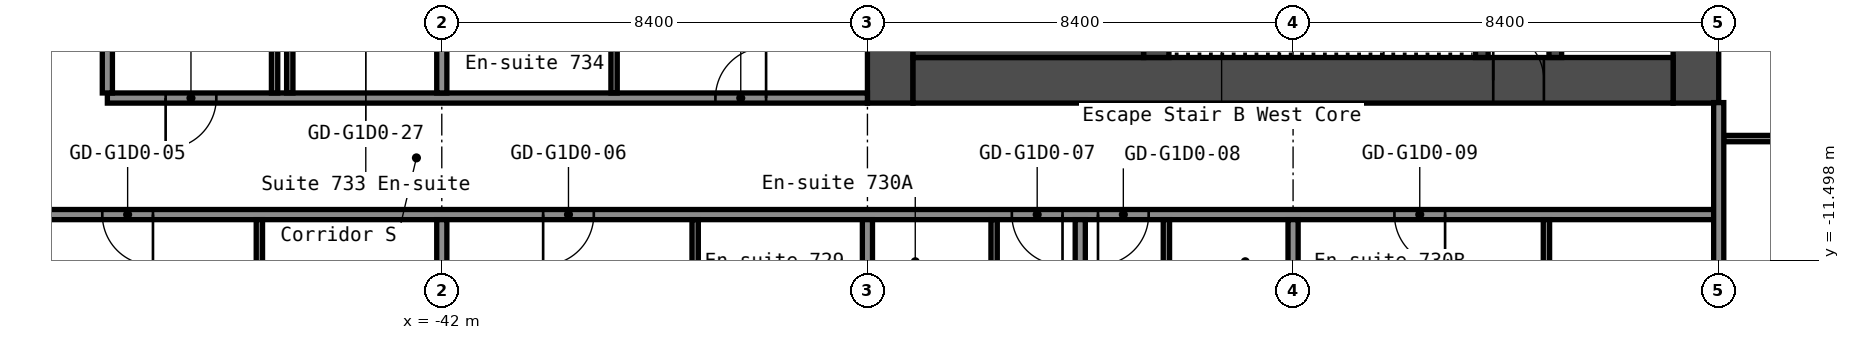
"""IFC4 building model, lengths in metres.
Left out: names, types, materials, properties, quantities, classifications, styles, units other than length and angle.
Written with IfcOpenShell. Run it as: python <this file> out.ifc"""

import sys

from ifc_helpers import new_model, si_unit, direction, frame, frame_2d, origin, place, context, subcontext, project, spatial, rectangle, extrude, element, fill, save


model = new_model("IFC4")
c1 = context("Model", 3, precision=1e-05, world=origin(), true_north=direction((0.0, 1.0)))
c2 = subcontext(c1, "Body", "Model", "MODEL_VIEW")
j1 = project(units=[si_unit("LENGTHUNIT", "METRE"), si_unit("PLANEANGLEUNIT", "RADIAN")], contexts=[c1])
p1 = place(None, origin())
s1 = spatial("IfcSite", under=j1, at=p1, CompositionType="ELEMENT")
p2 = place(p1, origin())
s2 = spatial("IfcBuilding", under=s1, at=p2, CompositionType="ELEMENT")
p3 = place(p2, frame((0.0, 0.0, 29.4)))
s3 = spatial("IfcBuildingStorey", under=s2, at=p3, CompositionType="ELEMENT", Elevation=29.4)
p4 = place(p3, frame((-17.25, -8.4, 0.0), z_axis=(0.0, 0.0, 1.0), x_axis=(0.0, 1.0, 0.0)))
e1 = element("IfcWall", 1, at=p4, inside=s3, PredefinedType="SHEAR", context=c2, shape_type="SweptSolid", body=[
    extrude(rectangle(XDim=16.8, YDim=0.9, at=frame_2d((8.4, 0.0))), origin(), (0.0, 0.0, 1.0), 2.8),
])
p5 = place(p4, frame((12.75, 0.0, 0.0)))
e2 = element("IfcOpeningElement", 2, at=p5, cuts=e1, PredefinedType="OPENING", context=c2, shape_type="SweptSolid", body=[
    extrude(rectangle(XDim=1.2, YDim=2.1, at=frame_2d((0.6, 1.05))), frame((0.0, 0.46, 0.0), z_axis=(0.0, -1.0, 0.0), x_axis=(1.0, 0.0, 0.0)), (0.0, 0.0, 1.0), 0.92),
])
p6 = place(p4, frame((2.85, 0.0, 0.0)))
e3 = element("IfcOpeningElement", 3, at=p6, cuts=e1, PredefinedType="OPENING", context=c2, shape_type="SweptSolid", body=[
    extrude(rectangle(XDim=1.2, YDim=2.1, at=frame_2d((0.6, 1.05))), frame((0.0, 0.46, 0.0), z_axis=(0.0, -1.0, 0.0), x_axis=(1.0, 0.0, 0.0)), (0.0, 0.0, 1.0), 0.92),
])
p7 = place(p3, frame((-33.15, -8.4, 0.0), z_axis=(0.0, 0.0, 1.0), x_axis=(0.0, 1.0, 0.0)))
e4 = element("IfcWall", 4, at=p7, inside=s3, PredefinedType="SHEAR", context=c2, shape_type="SweptSolid", body=[
    extrude(rectangle(XDim=16.8, YDim=0.9, at=frame_2d((8.4, 0.0))), origin(), (0.0, 0.0, 1.0), 2.8),
])
p8 = place(p3, frame((-32.7, -7.95, 0.0), z_axis=(0.0, 0.0, 1.0), x_axis=(1.0, 0.0, 0.0)))
e5 = element("IfcWall", 5, at=p8, inside=s3, PredefinedType="SHEAR", context=c2, shape_type="SweptSolid", body=[
    extrude(rectangle(XDim=15.0, YDim=0.9, at=frame_2d((7.5, 0.0))), origin(), (0.0, 0.0, 1.0), 2.8),
])
p9 = place(p8, frame((11.45, 0.0, 0.0)))
e6 = element("IfcOpeningElement", 6, at=p9, cuts=e5, PredefinedType="OPENING", context=c2, shape_type="SweptSolid", body=[
    extrude(rectangle(XDim=1.0, YDim=2.1, at=frame_2d((0.5, 1.05))), frame((0.0, 0.46, 0.0), z_axis=(0.0, -1.0, 0.0), x_axis=(1.0, 0.0, 0.0)), (0.0, 0.0, 1.0), 0.92),
])
p10 = place(p3, frame((-20.025, -7.5, 0.0), z_axis=(0.0, 0.0, 1.0), x_axis=(0.0, 1.0, 0.0)))
e7 = element("IfcWall", 7, at=p10, inside=s3, PredefinedType="SHEAR", context=c2, shape_type="SweptSolid", body=[
    extrude(rectangle(XDim=6.3, YDim=0.25, at=frame_2d((3.15, 0.0))), origin(), (0.0, 0.0, 1.0), 2.8),
])
p11 = place(p10, frame((2.4, 0.0, 0.0)))
e8 = element("IfcOpeningElement", 8, at=p11, cuts=e7, PredefinedType="OPENING", context=c2, shape_type="SweptSolid", body=[
    extrude(rectangle(XDim=1.0, YDim=2.1, at=frame_2d((0.5, 1.05))), frame((0.0, 0.135, 0.0), z_axis=(0.0, -1.0, 0.0), x_axis=(1.0, 0.0, 0.0)), (0.0, 0.0, 1.0), 0.27),
])
p12 = place(p3, frame((-21.475, -7.5, 0.0), z_axis=(0.0, 0.0, 1.0), x_axis=(0.0, 1.0, 0.0)))
e9 = element("IfcWall", 9, at=p12, inside=s3, PredefinedType="SHEAR", context=c2, shape_type="SweptSolid", body=[
    extrude(rectangle(XDim=3.75, YDim=0.25, at=frame_2d((1.875, 0.0))), origin(), (0.0, 0.0, 1.0), 2.8),
])
p13 = place(p12, frame((1.3, 0.0, 0.0)))
e10 = element("IfcOpeningElement", 10, at=p13, cuts=e9, PredefinedType="OPENING", context=c2, shape_type="SweptSolid", body=[
    extrude(rectangle(XDim=1.2, YDim=2.1, at=frame_2d((0.6, 1.05))), frame((0.0, 0.135, 0.0), z_axis=(0.0, -1.0, 0.0), x_axis=(1.0, 0.0, 0.0)), (0.0, 0.0, 1.0), 0.27),
])
p14 = place(p3, frame((-27.9, -7.5, 0.0), z_axis=(0.0, 0.0, 1.0), x_axis=(0.0, 1.0, 0.0)))
e11 = element("IfcWall", 11, at=p14, inside=s3, PredefinedType="SHEAR", context=c2, shape_type="SweptSolid", body=[
    extrude(rectangle(XDim=3.75, YDim=0.5, at=frame_2d((1.875, 0.0))), origin(), (0.0, 0.0, 1.0), 2.8),
])
p15 = place(p3, frame((-32.7, -6.75, 0.0), z_axis=(0.0, 0.0, 1.0), x_axis=(1.0, 0.0, 0.0)))
e12 = element("IfcWall", 12, at=p15, inside=s3, PredefinedType="SHEAR", context=c2, shape_type="SweptSolid", body=[
    extrude(rectangle(XDim=4.55, YDim=1.5, at=frame_2d((2.275, 0.0))), origin(), (0.0, 0.0, 1.0), 2.8),
])
p16 = place(p3, frame((-51.1, -10.6, 0.0), z_axis=(0.0, 0.0, 1.0), x_axis=(1.0, 0.0, 0.0)))
e13 = element("IfcWall", 13, at=p16, inside=s3, PredefinedType="PARTITIONING", context=c2, shape_type="SweptSolid", body=[
    extrude(rectangle(XDim=34.3, YDim=0.2, at=frame_2d((17.15, 0.0))), origin(), (0.0, 0.0, 1.0), 2.8),
])
p17 = place(p16, frame((2.4, 0.0, 0.0)))
e14 = element("IfcOpeningElement", 14, at=p17, cuts=e13, PredefinedType="OPENING", context=c2, shape_type="SweptSolid", body=[
    extrude(rectangle(XDim=1.0, YDim=2.1, at=frame_2d((0.5, 1.05))), frame((0.0, 0.11, 0.0), z_axis=(0.0, -1.0, 0.0), x_axis=(1.0, 0.0, 0.0)), (0.0, 0.0, 1.0), 0.22),
])
p18 = place(p16, frame((11.1, 0.0, 0.0)))
e15 = element("IfcOpeningElement", 15, at=p18, cuts=e13, PredefinedType="OPENING", context=c2, shape_type="SweptSolid", body=[
    extrude(rectangle(XDim=1.0, YDim=2.1, at=frame_2d((0.5, 1.05))), frame((0.0, 0.11, 0.0), z_axis=(0.0, -1.0, 0.0), x_axis=(1.0, 0.0, 0.0)), (0.0, 0.0, 1.0), 0.22),
])
p19 = place(p16, frame((20.35, 0.0, 0.0)))
e16 = element("IfcOpeningElement", 16, at=p19, cuts=e13, PredefinedType="OPENING", context=c2, shape_type="SweptSolid", body=[
    extrude(rectangle(XDim=1.0, YDim=2.1, at=frame_2d((0.5, 1.05))), frame((0.0, 0.11, 0.0), z_axis=(0.0, -1.0, 0.0), x_axis=(1.0, 0.0, 0.0)), (0.0, 0.0, 1.0), 0.22),
])
p20 = place(p16, frame((22.05, 0.0, 0.0)))
e17 = element("IfcOpeningElement", 17, at=p20, cuts=e13, PredefinedType="OPENING", context=c2, shape_type="SweptSolid", body=[
    extrude(rectangle(XDim=1.0, YDim=2.1, at=frame_2d((0.5, 1.05))), frame((0.0, 0.11, 0.0), z_axis=(0.0, -1.0, 0.0), x_axis=(1.0, 0.0, 0.0)), (0.0, 0.0, 1.0), 0.22),
])
p21 = place(p16, frame((27.9, 0.0, 0.0)))
e18 = element("IfcOpeningElement", 18, at=p21, cuts=e13, PredefinedType="OPENING", context=c2, shape_type="SweptSolid", body=[
    extrude(rectangle(XDim=1.0, YDim=2.1, at=frame_2d((0.5, 1.05))), frame((0.0, 0.11, 0.0), z_axis=(0.0, -1.0, 0.0), x_axis=(1.0, 0.0, 0.0)), (0.0, 0.0, 1.0), 0.22),
])
p22 = place(p3, frame((-16.7, -9.1, 0.0), z_axis=(0.0, 0.0, 1.0), x_axis=(1.0, 0.0, 0.0)))
e19 = element("IfcWall", 19, at=p22, inside=s3, PredefinedType="PARTITIONING", context=c2, shape_type="SweptSolid", body=[
    extrude(rectangle(XDim=2.337, YDim=0.125, at=frame_2d((1.169, 0.0))), origin(), (0.0, 0.0, 1.0), 2.8),
])
p23 = place(p3, frame((-48.6, -8.3, 0.0), z_axis=(0.0, 0.0, 1.0), x_axis=(1.0, 0.0, 0.0)))
e20 = element("IfcWall", 20, at=p23, inside=s3, PredefinedType="PARTITIONING", context=c2, shape_type="SweptSolid", body=[
    extrude(rectangle(XDim=15.0, YDim=0.2, at=frame_2d((7.5, 0.0))), origin(), (0.0, 0.0, 1.0), 2.8),
])
p24 = place(p23, frame((1.15, 0.0, 0.0)))
e21 = element("IfcOpeningElement", 21, at=p24, cuts=e20, PredefinedType="OPENING", context=c2, shape_type="SweptSolid", body=[
    extrude(rectangle(XDim=1.0, YDim=2.1, at=frame_2d((0.5, 1.05))), frame((0.0, 0.11, 0.0), z_axis=(0.0, -1.0, 0.0), x_axis=(1.0, 0.0, 0.0)), (0.0, 0.0, 1.0), 0.22),
])
p25 = place(p23, frame((12.0, 0.0, 0.0)))
e22 = element("IfcOpeningElement", 22, at=p25, cuts=e20, PredefinedType="OPENING", context=c2, shape_type="SweptSolid", body=[
    extrude(rectangle(XDim=1.0, YDim=2.1, at=frame_2d((0.5, 1.05))), frame((0.0, 0.11, 0.0), z_axis=(0.0, -1.0, 0.0), x_axis=(1.0, 0.0, 0.0)), (0.0, 0.0, 1.0), 0.22),
])
p26 = place(p3, frame((-48.6, -8.2, 0.0), z_axis=(0.0, 0.0, 1.0), x_axis=(0.0, 1.0, 0.0)))
e23 = element("IfcWall", 23, at=p26, inside=s3, PredefinedType="PARTITIONING", context=c2, shape_type="SweptSolid", body=[
    extrude(rectangle(XDim=16.4, YDim=0.2, at=frame_2d((8.2, 0.0))), origin(), (0.0, 0.0, 1.0), 2.8),
])
p27 = place(p3, frame((-45.6, -14.0, 0.0), z_axis=(0.0, 0.0, 1.0), x_axis=(0.0, 1.0, 0.0)))
e24 = element("IfcWall", 24, at=p27, inside=s3, PredefinedType="PARTITIONING", context=c2, shape_type="SweptSolid", body=[
    extrude(rectangle(XDim=3.3, YDim=0.125, at=frame_2d((1.65, 0.0))), origin(), (0.0, 0.0, 1.0), 2.8),
])
p28 = place(p27, frame((1.2, 0.0, 0.0)))
e25 = element("IfcOpeningElement", 25, at=p28, cuts=e24, PredefinedType="OPENING", context=c2, shape_type="SweptSolid", body=[
    extrude(rectangle(XDim=1.0, YDim=2.1, at=frame_2d((0.5, 1.05))), frame((0.0, 0.073, 0.0), z_axis=(0.0, -1.0, 0.0), x_axis=(1.0, 0.0, 0.0)), (0.0, 0.0, 1.0), 0.145),
])
p29 = place(p3, frame((-45.3, -8.2, 0.0), z_axis=(0.0, 0.0, 1.0), x_axis=(0.0, 1.0, 0.0)))
e26 = element("IfcWall", 26, at=p29, inside=s3, PredefinedType="PARTITIONING", context=c2, shape_type="SweptSolid", body=[
    extrude(rectangle(XDim=8.1, YDim=0.125, at=frame_2d((4.05, 0.0))), origin(), (0.0, 0.0, 1.0), 2.8),
])
p30 = place(p29, frame((4.05, 0.0, 0.0)))
e27 = element("IfcOpeningElement", 27, at=p30, cuts=e26, PredefinedType="OPENING", context=c2, shape_type="SweptSolid", body=[
    extrude(rectangle(XDim=0.9, YDim=2.1, at=frame_2d((0.45, 1.05))), frame((0.0, 0.073, 0.0), z_axis=(0.0, -1.0, 0.0), x_axis=(1.0, 0.0, 0.0)), (0.0, 0.0, 1.0), 0.145),
])
p31 = place(p3, frame((-45.0, -8.2, 0.0), z_axis=(0.0, 0.0, 1.0), x_axis=(0.0, 1.0, 0.0)))
e28 = element("IfcWall", 28, at=p31, inside=s3, PredefinedType="PARTITIONING", context=c2, shape_type="SweptSolid", body=[
    extrude(rectangle(XDim=3.1, YDim=0.125, at=frame_2d((1.55, 0.0))), origin(), (0.0, 0.0, 1.0), 2.8),
])
p32 = place(p3, frame((-42.0, -20.3, 0.0), z_axis=(0.0, 0.0, 1.0), x_axis=(0.0, 1.0, 0.0)))
e29 = element("IfcWall", 29, at=p32, inside=s3, PredefinedType="PARTITIONING", context=c2, shape_type="SweptSolid", body=[
    extrude(rectangle(XDim=9.6, YDim=0.2, at=frame_2d((4.8, 0.0))), origin(), (0.0, 0.0, 1.0), 2.8),
])
p33 = place(p3, frame((-42.0, -8.2, 0.0), z_axis=(0.0, 0.0, 1.0), x_axis=(0.0, 1.0, 0.0)))
e30 = element("IfcWall", 30, at=p33, inside=s3, PredefinedType="PARTITIONING", context=c2, shape_type="SweptSolid", body=[
    extrude(rectangle(XDim=8.2, YDim=0.2, at=frame_2d((4.1, 0.0))), origin(), (0.0, 0.0, 1.0), 2.8),
])
for number, where, z_axis, x_axis in (
    (31, (-38.6, -8.2, 0.0), (0.0, 0.0, 1.0), (0.0, 1.0, 0.0)),
    (32, (-37.0, -14.0, 0.0), (0.0, 0.0, 1.0), (0.0, 1.0, 0.0)),
):
    element("IfcWall", number, at=place(p3, frame(where, z_axis=z_axis, x_axis=x_axis)), inside=s3, PredefinedType="PARTITIONING", context=c2, shape_type="SweptSolid", body=[
        extrude(rectangle(XDim=3.3, YDim=0.125, at=frame_2d((1.65, 0.0))), origin(), (0.0, 0.0, 1.0), 2.8),
    ])
p34 = place(p3, frame((-33.6, -20.3, 0.0), z_axis=(0.0, 0.0, 1.0), x_axis=(0.0, 1.0, 0.0)))
e33 = element("IfcWall", 33, at=p34, inside=s3, PredefinedType="PARTITIONING", context=c2, shape_type="SweptSolid", body=[
    extrude(rectangle(XDim=9.6, YDim=0.2, at=frame_2d((4.8, 0.0))), origin(), (0.0, 0.0, 1.0), 2.8),
])
p35 = place(p3, frame((-31.1, -13.6, 0.0), z_axis=(0.0, 0.0, 1.0), x_axis=(0.0, 1.0, 0.0)))
e34 = element("IfcWall", 34, at=p35, inside=s3, PredefinedType="PARTITIONING", context=c2, shape_type="SweptSolid", body=[
    extrude(rectangle(XDim=2.9, YDim=0.125, at=frame_2d((1.45, 0.0))), origin(), (0.0, 0.0, 1.0), 2.8),
])
p36 = place(p35, frame((0.6, 0.0, 0.0)))
e35 = element("IfcOpeningElement", 35, at=p36, cuts=e34, PredefinedType="OPENING", context=c2, shape_type="SweptSolid", body=[
    extrude(rectangle(XDim=0.8, YDim=2.1, at=frame_2d((0.4, 1.05))), frame((0.0, 0.073, 0.0), z_axis=(0.0, -1.0, 0.0), x_axis=(1.0, 0.0, 0.0)), (0.0, 0.0, 1.0), 0.145),
])
p37 = place(p3, frame((-29.4, -20.3, 0.0), z_axis=(0.0, 0.0, 1.0), x_axis=(0.0, 1.0, 0.0)))
e36 = element("IfcWall", 36, at=p37, inside=s3, PredefinedType="PARTITIONING", context=c2, shape_type="SweptSolid", body=[
    extrude(rectangle(XDim=9.6, YDim=0.2, at=frame_2d((4.8, 0.0))), origin(), (0.0, 0.0, 1.0), 2.8),
])
p38 = place(p3, frame((-27.7, -13.6, 0.0), z_axis=(0.0, 0.0, 1.0), x_axis=(0.0, 1.0, 0.0)))
e37 = element("IfcWall", 37, at=p38, inside=s3, PredefinedType="PARTITIONING", context=c2, shape_type="SweptSolid", body=[
    extrude(rectangle(XDim=2.9, YDim=0.125, at=frame_2d((1.45, 0.0))), origin(), (0.0, 0.0, 1.0), 2.8),
])
p39 = place(p38, frame((0.6, 0.0, 0.0)))
e38 = element("IfcOpeningElement", 38, at=p39, cuts=e37, PredefinedType="OPENING", context=c2, shape_type="SweptSolid", body=[
    extrude(rectangle(XDim=0.8, YDim=2.1, at=frame_2d((0.4, 1.05))), frame((0.0, 0.073, 0.0), z_axis=(0.0, -1.0, 0.0), x_axis=(1.0, 0.0, 0.0)), (0.0, 0.0, 1.0), 0.145),
])
p40 = place(p3, frame((-25.2, -20.3, 0.0), z_axis=(0.0, 0.0, 1.0), x_axis=(0.0, 1.0, 0.0)))
e39 = element("IfcWall", 39, at=p40, inside=s3, PredefinedType="PARTITIONING", context=c2, shape_type="SweptSolid", body=[
    extrude(rectangle(XDim=9.6, YDim=0.2, at=frame_2d((4.8, 0.0))), origin(), (0.0, 0.0, 1.0), 2.8),
])
p41 = place(p3, frame((-20.2, -14.0, 0.0), z_axis=(0.0, 0.0, 1.0), x_axis=(0.0, 1.0, 0.0)))
e40 = element("IfcWall", 40, at=p41, inside=s3, PredefinedType="PARTITIONING", context=c2, shape_type="SweptSolid", body=[
    extrude(rectangle(XDim=3.3, YDim=0.125, at=frame_2d((1.65, 0.0))), origin(), (0.0, 0.0, 1.0), 2.8),
])
p42 = place(p3, frame((-16.8, -20.3, 0.0), z_axis=(0.0, 0.0, 1.0), x_axis=(0.0, 1.0, 0.0)))
e41 = element("IfcWall", 41, at=p42, inside=s3, PredefinedType="PARTITIONING", context=c2, shape_type="SweptSolid", body=[
    extrude(rectangle(XDim=11.91, YDim=0.2, at=frame_2d((5.955, 0.0))), origin(), (0.0, 0.0, 1.0), 2.8),
])
p43 = place(p9, origin())
e42 = element("IfcDoor", 42, at=p43, inside=s3, OperationType="SINGLE_SWING_RIGHT", PredefinedType="DOOR", context=c2, shape_type="SweptSolid", body=[
    extrude(rectangle(XDim=1.0, YDim=2.1, at=frame_2d((0.5, 1.05))), frame((0.0, 0.025, 0.0), z_axis=(0.0, -1.0, 0.0), x_axis=(1.0, 0.0, 0.0)), (0.0, 0.0, 1.0), 0.05),
])
fill(e6, e42)
p44 = place(p17, origin())
e43 = element("IfcDoor", 43, at=p44, inside=s3, OperationType="SINGLE_SWING_RIGHT", PredefinedType="DOOR", context=c2, shape_type="SweptSolid", body=[
    extrude(rectangle(XDim=1.0, YDim=2.1, at=frame_2d((0.5, 1.05))), frame((0.0, 0.025, 0.0), z_axis=(0.0, -1.0, 0.0), x_axis=(1.0, 0.0, 0.0)), (0.0, 0.0, 1.0), 0.05),
])
fill(e14, e43)
p45 = place(p18, origin())
e44 = element("IfcDoor", 44, at=p45, inside=s3, OperationType="SINGLE_SWING_LEFT", PredefinedType="DOOR", context=c2, shape_type="SweptSolid", body=[
    extrude(rectangle(XDim=1.0, YDim=2.1, at=frame_2d((0.5, 1.05))), frame((0.0, 0.025, 0.0), z_axis=(0.0, -1.0, 0.0), x_axis=(1.0, 0.0, 0.0)), (0.0, 0.0, 1.0), 0.05),
])
fill(e15, e44)
p46 = place(p19, origin())
e45 = element("IfcDoor", 45, at=p46, inside=s3, OperationType="SINGLE_SWING_RIGHT", PredefinedType="DOOR", context=c2, shape_type="SweptSolid", body=[
    extrude(rectangle(XDim=1.0, YDim=2.1, at=frame_2d((0.5, 1.05))), frame((0.0, 0.025, 0.0), z_axis=(0.0, -1.0, 0.0), x_axis=(1.0, 0.0, 0.0)), (0.0, 0.0, 1.0), 0.05),
])
fill(e16, e45)
p47 = place(p20, origin())
e46 = element("IfcDoor", 46, at=p47, inside=s3, OperationType="SINGLE_SWING_LEFT", PredefinedType="DOOR", context=c2, shape_type="SweptSolid", body=[
    extrude(rectangle(XDim=1.0, YDim=2.1, at=frame_2d((0.5, 1.05))), frame((0.0, 0.025, 0.0), z_axis=(0.0, -1.0, 0.0), x_axis=(1.0, 0.0, 0.0)), (0.0, 0.0, 1.0), 0.05),
])
fill(e17, e46)
p48 = place(p21, origin())
e47 = element("IfcDoor", 47, at=p48, inside=s3, OperationType="SINGLE_SWING_RIGHT", PredefinedType="DOOR", context=c2, shape_type="SweptSolid", body=[
    extrude(rectangle(XDim=1.0, YDim=2.1, at=frame_2d((0.5, 1.05))), frame((0.0, 0.025, 0.0), z_axis=(0.0, -1.0, 0.0), x_axis=(1.0, 0.0, 0.0)), (0.0, 0.0, 1.0), 0.05),
])
fill(e18, e47)
p49 = place(p24, origin())
e48 = element("IfcDoor", 48, at=p49, inside=s3, OperationType="SINGLE_SWING_LEFT", PredefinedType="DOOR", context=c2, shape_type="SweptSolid", body=[
    extrude(rectangle(XDim=1.0, YDim=2.1, at=frame_2d((0.5, 1.05))), frame((0.0, 0.025, 0.0), z_axis=(0.0, -1.0, 0.0), x_axis=(1.0, 0.0, 0.0)), (0.0, 0.0, 1.0), 0.05),
])
fill(e21, e48)
p50 = place(p25, origin())
e49 = element("IfcDoor", 49, at=p50, inside=s3, OperationType="SINGLE_SWING_LEFT", PredefinedType="DOOR", context=c2, shape_type="SweptSolid", body=[
    extrude(rectangle(XDim=1.0, YDim=2.1, at=frame_2d((0.5, 1.05))), frame((0.0, 0.025, 0.0), z_axis=(0.0, -1.0, 0.0), x_axis=(1.0, 0.0, 0.0)), (0.0, 0.0, 1.0), 0.05),
])
fill(e22, e49)
save(model, sys.argv[1])
